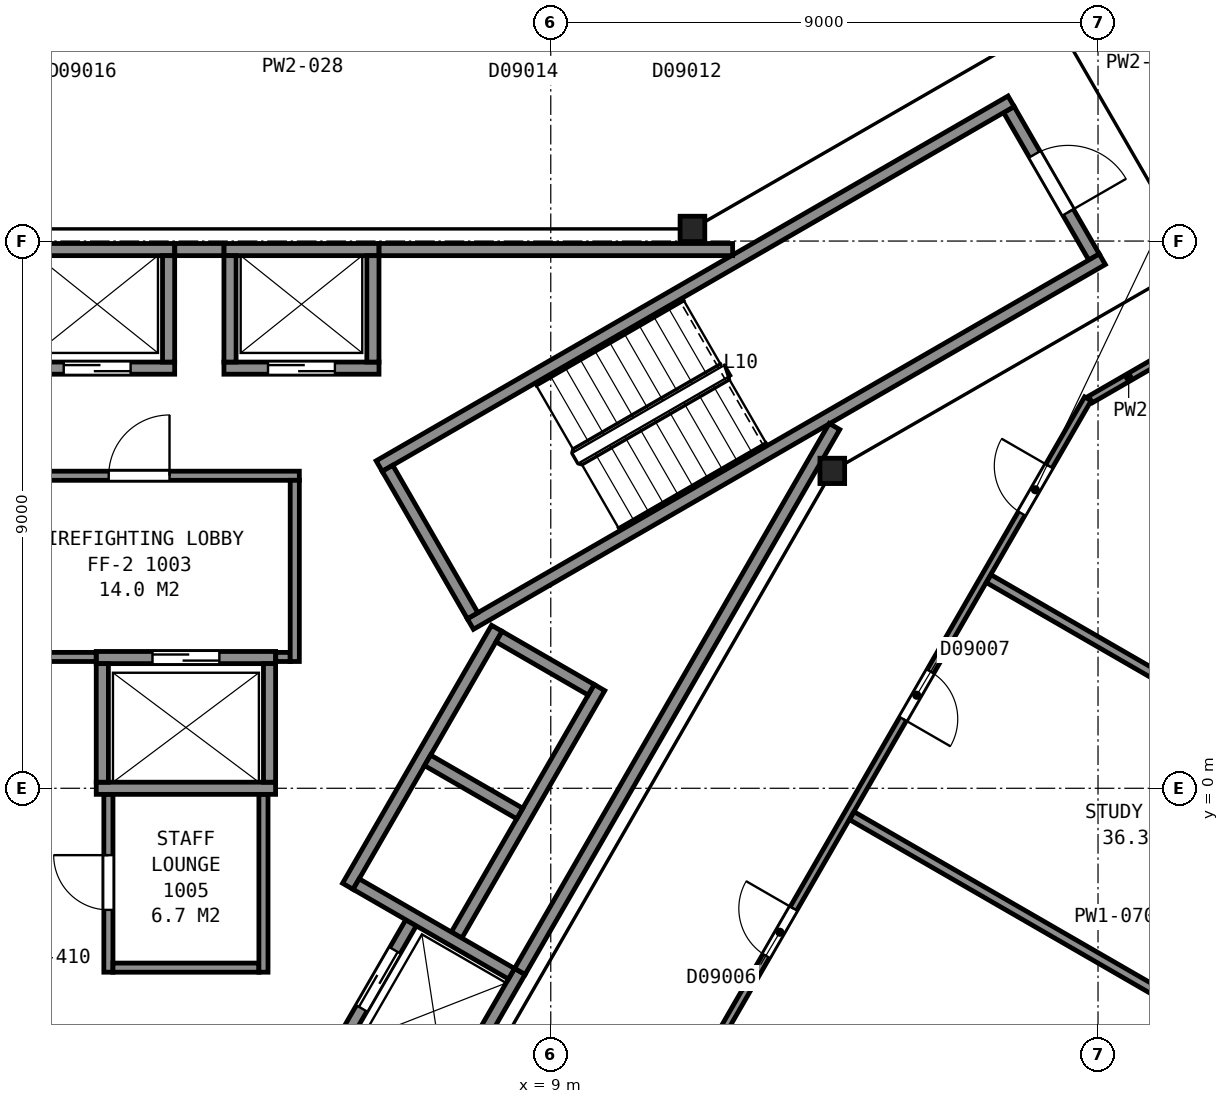
"""IFC4 building model, lengths in metres.
Left out: names, types, materials, properties, quantities, classifications, styles, units other than length and angle.
Written with IfcOpenShell. Run it as: python <this file> out.ifc"""

import sys

from ifc_helpers import new_model, si_unit, direction, frame, frame_2d, origin, origin_2d, place, context, subcontext, project, spatial, rectangle, i_section, extrude, element, fill, save


model = new_model("IFC4")
c1 = context("Model", 3, precision=1e-05, world=origin(), true_north=direction((0.0, 1.0)))
c2 = subcontext(c1, "Body", "Model", "MODEL_VIEW")
j1 = project(units=[si_unit("LENGTHUNIT", "METRE"), si_unit("PLANEANGLEUNIT", "RADIAN")], contexts=[c1])
p1 = place(None, origin())
s1 = spatial("IfcSite", under=j1, at=p1, CompositionType="ELEMENT")
p2 = place(p1, origin())
s2 = spatial("IfcBuilding", under=s1, at=p2, CompositionType="ELEMENT")
p3 = place(p2, frame((0.0, 0.0, 51.2)))
s3 = spatial("IfcBuildingStorey", under=s2, at=p3, CompositionType="ELEMENT", Elevation=51.2)
for number, where, z_axis, x_axis in (
    (1, (13.63, 5.22, 0.0), (0.0, 0.0, 1.0), (1.0, 0.0, 0.0)),
    (2, (11.33, 9.2, 0.0), (0.0, 0.0, 1.0), (1.0, 0.0, 0.0)),
):
    element("IfcColumn", number, at=place(p3, frame(where, z_axis=z_axis, x_axis=x_axis)), inside=s3, PredefinedType="COLUMN", context=c2, shape_type="SweptSolid", body=[
        extrude(i_section(OverallWidth=0.406, OverallDepth=0.417, WebThickness=0.03, FlangeThickness=0.048, FilletRadius=0.015, at=origin_2d()), origin(), (0.0, 0.0, 1.0), 3.6),
    ])
p4 = place(p3, frame((17.934, 8.738, 0.0), z_axis=(0.0, 0.0, 1.0), x_axis=(-0.49998411664, 0.866034573852, 0.0)))
e3 = element("IfcWall", 3, at=p4, inside=s3, PredefinedType="PARTITIONING", context=c2, shape_type="SweptSolid", body=[
    extrude(rectangle(XDim=2.8, YDim=0.2, at=frame_2d((1.4, 0.0))), origin(), (0.0, 0.0, 1.0), 3.35),
])
p5 = place(p4, frame((0.85, 0.0, 0.0)))
e4 = element("IfcOpeningElement", 4, at=p5, cuts=e3, PredefinedType="OPENING", context=c2, shape_type="SweptSolid", body=[
    extrude(rectangle(XDim=1.1, YDim=2.1, at=frame_2d((0.55, 1.05))), frame((0.0, 0.11, 0.0), z_axis=(0.0, -1.0, 0.0), x_axis=(1.0, 0.0, 0.0)), (0.0, 0.0, 1.0), 0.22),
])
for number, where, z_axis, x_axis in (
    (5, (6.178, 5.299, 0.0), (0.0, 0.0, 1.0), (0.866, 0.5, 0.0)),
    (6, (7.678, 2.701, 0.0), (0.0, 0.0, 1.0), (0.866, 0.5, 0.0)),
):
    element("IfcWall", number, at=place(p3, frame(where, z_axis=z_axis, x_axis=x_axis)), inside=s3, PredefinedType="PARTITIONING", context=c2, shape_type="SweptSolid", body=[
        extrude(rectangle(XDim=12.0, YDim=0.2, at=frame_2d((6.0, 0.0))), origin(), (0.0, 0.0, 1.0), 3.35),
    ])
p6 = place(p3, frame((7.715, 2.838, 0.0), z_axis=(0.0, 0.0, 1.0), x_axis=(-0.500049511043, 0.865996816683, 0.0)))
e7 = element("IfcWall", 7, at=p6, inside=s3, PredefinedType="PARTITIONING", context=c2, shape_type="SweptSolid", body=[
    extrude(rectangle(XDim=2.8, YDim=0.2, at=frame_2d((1.4, 0.0))), origin(), (0.0, 0.0, 1.0), 3.35),
])
p7 = place(p3, frame((1.525, 0.0, 0.0), z_axis=(0.0, 0.0, 1.0), x_axis=(1.0, 0.0, 0.0)))
e8 = element("IfcWall", 8, at=p7, inside=s3, PredefinedType="PARTITIONING", context=c2, shape_type="SweptSolid", body=[
    extrude(rectangle(XDim=2.95, YDim=0.2, at=frame_2d((1.475, 0.0))), origin(), (0.0, 0.0, 1.0), 3.6),
])
p8 = place(p3, frame((1.525, 2.15, 0.0), z_axis=(0.0, 0.0, 1.0), x_axis=(1.0, 0.0, 0.0)))
e9 = element("IfcWall", 9, at=p8, inside=s3, PredefinedType="PARTITIONING", context=c2, shape_type="SweptSolid", body=[
    extrude(rectangle(XDim=2.95, YDim=0.2, at=frame_2d((1.475, 0.0))), origin(), (0.0, 0.0, 1.0), 3.6),
])
p9 = place(p8, frame((0.925, 0.0, 0.0)))
e10 = element("IfcOpeningElement", 10, at=p9, cuts=e9, PredefinedType="OPENING", context=c2, shape_type="SweptSolid", body=[
    extrude(rectangle(XDim=1.1, YDim=2.1, at=frame_2d((0.55, 1.05))), frame((0.0, 0.11, 0.0), z_axis=(0.0, -1.0, 0.0), x_axis=(1.0, 0.0, 0.0)), (0.0, 0.0, 1.0), 0.22),
])
p10 = place(p3, frame((0.265, 6.91, 0.0), z_axis=(0.0, 0.0, 1.0), x_axis=(1.0, 0.0, 0.0)))
e11 = element("IfcWall", 11, at=p10, inside=s3, PredefinedType="PARTITIONING", context=c2, shape_type="SweptSolid", body=[
    extrude(rectangle(XDim=2.55, YDim=0.2, at=frame_2d((1.275, 0.0))), origin(), (0.0, 0.0, 1.0), 3.6),
])
p11 = place(p10, frame((0.725, 0.0, 0.0)))
e12 = element("IfcOpeningElement", 12, at=p11, cuts=e11, PredefinedType="OPENING", context=c2, shape_type="SweptSolid", body=[
    extrude(rectangle(XDim=1.1, YDim=2.1, at=frame_2d((0.55, 1.05))), frame((0.0, 0.11, 0.0), z_axis=(0.0, -1.0, 0.0), x_axis=(1.0, 0.0, 0.0)), (0.0, 0.0, 1.0), 0.22),
])
p12 = place(p3, frame((3.625, 6.91, 0.0), z_axis=(0.0, 0.0, 1.0), x_axis=(1.0, 0.0, 0.0)))
e13 = element("IfcWall", 13, at=p12, inside=s3, PredefinedType="PARTITIONING", context=c2, shape_type="SweptSolid", body=[
    extrude(rectangle(XDim=2.55, YDim=0.2, at=frame_2d((1.275, 0.0))), origin(), (0.0, 0.0, 1.0), 3.6),
])
p13 = place(p12, frame((0.725, 0.0, 0.0)))
e14 = element("IfcOpeningElement", 14, at=p13, cuts=e13, PredefinedType="OPENING", context=c2, shape_type="SweptSolid", body=[
    extrude(rectangle(XDim=1.1, YDim=2.1, at=frame_2d((0.55, 1.05))), frame((0.0, 0.11, 0.0), z_axis=(0.0, -1.0, 0.0), x_axis=(1.0, 0.0, 0.0)), (0.0, 0.0, 1.0), 0.22),
])
for number, where, z_axis, x_axis in (
    (15, (0.265, 8.86, 0.0), (0.0, 0.0, 1.0), (1.0, 0.0, 0.0)),
    (16, (3.625, 8.86, 0.0), (0.0, 0.0, 1.0), (1.0, 0.0, 0.0)),
):
    element("IfcWall", number, at=place(p3, frame(where, z_axis=z_axis, x_axis=x_axis)), inside=s3, PredefinedType="PARTITIONING", context=c2, shape_type="SweptSolid", body=[
        extrude(rectangle(XDim=2.55, YDim=0.2, at=frame_2d((1.275, 0.0))), origin(), (0.0, 0.0, 1.0), 3.6),
    ])
p14 = place(p3, frame((7.216, -5.222, 0.0), z_axis=(0.0, 0.0, 1.0), x_axis=(0.499990435942, 0.866030925526, 0.0)))
e17 = element("IfcWall", 17, at=p14, inside=s3, PredefinedType="PARTITIONING", context=c2, shape_type="SweptSolid", body=[
    extrude(rectangle(XDim=2.55, YDim=0.2, at=frame_2d((1.275, 0.0))), origin(), (0.0, 0.0, 1.0), 3.6),
])
p15 = place(p3, frame((7.451, -2.414, 0.0), z_axis=(0.0, 0.0, 1.0), x_axis=(0.500016218704, 0.866016039709, 0.0)))
e18 = element("IfcWall", 18, at=p15, inside=s3, PredefinedType="PARTITIONING", context=c2, shape_type="SweptSolid", body=[
    extrude(rectangle(XDim=4.7, YDim=0.2, at=frame_2d((2.35, 0.0))), origin(), (0.0, 0.0, 1.0), 3.6),
])
p16 = place(p3, frame((5.527, -4.247, 0.0), z_axis=(0.0, 0.0, 1.0), x_axis=(0.499938297808, 0.866061024631, 0.0)))
e19 = element("IfcWall", 19, at=p16, inside=s3, PredefinedType="PARTITIONING", context=c2, shape_type="SweptSolid", body=[
    extrude(rectangle(XDim=2.35, YDim=0.2, at=frame_2d((1.175, 0.0))), origin(), (0.0, 0.0, 1.0), 3.6),
])
p17 = place(p16, frame((0.725, 0.0, 0.0)))
e20 = element("IfcOpeningElement", 20, at=p17, cuts=e19, PredefinedType="OPENING", context=c2, shape_type="SweptSolid", body=[
    extrude(rectangle(XDim=1.1, YDim=2.1, at=frame_2d((0.55, 1.05))), frame((0.0, 0.11, 0.0), z_axis=(0.0, -1.0, 0.0), x_axis=(1.0, 0.0, 0.0)), (0.0, 0.0, 1.0), 0.22),
])
p18 = place(p3, frame((5.663, -1.612, 0.0), z_axis=(0.0, 0.0, 1.0), x_axis=(0.49998122708, 0.866036242063, 0.0)))
e21 = element("IfcWall", 21, at=p18, inside=s3, PredefinedType="PARTITIONING", context=c2, shape_type="SweptSolid", body=[
    extrude(rectangle(XDim=4.9, YDim=0.2, at=frame_2d((2.45, 0.0))), origin(), (0.0, 0.0, 1.0), 3.6),
])
p19 = place(p3, frame((6.075, 7.01, 0.0), z_axis=(0.0, 0.0, 1.0), x_axis=(0.0, 1.0, 0.0)))
e22 = element("IfcWall", 22, at=p19, inside=s3, PredefinedType="PARTITIONING", context=c2, shape_type="SweptSolid", body=[
    extrude(rectangle(XDim=1.75, YDim=0.2, at=frame_2d((0.875, 0.0))), origin(), (0.0, 0.0, 1.0), 3.6),
])
p20 = place(p3, frame((4.375, 0.1, 0.0), z_axis=(0.0, 0.0, 1.0), x_axis=(0.0, 1.0, 0.0)))
e23 = element("IfcWall", 23, at=p20, inside=s3, PredefinedType="PARTITIONING", context=c2, shape_type="SweptSolid", body=[
    extrude(rectangle(XDim=1.95, YDim=0.2, at=frame_2d((0.975, 0.0))), origin(), (0.0, 0.0, 1.0), 3.6),
])
for number, where, z_axis, x_axis in (
    (24, (3.725, 7.01, 0.0), (0.0, 0.0, 1.0), (0.0, 1.0, 0.0)),
    (25, (2.715, 7.01, 0.0), (0.0, 0.0, 1.0), (0.0, 1.0, 0.0)),
):
    element("IfcWall", number, at=place(p3, frame(where, z_axis=z_axis, x_axis=x_axis)), inside=s3, PredefinedType="PARTITIONING", context=c2, shape_type="SweptSolid", body=[
        extrude(rectangle(XDim=1.75, YDim=0.2, at=frame_2d((0.875, 0.0))), origin(), (0.0, 0.0, 1.0), 3.6),
    ])
p21 = place(p3, frame((1.625, 0.1, 0.0), z_axis=(0.0, 0.0, 1.0), x_axis=(0.0, 1.0, 0.0)))
e26 = element("IfcWall", 26, at=p21, inside=s3, PredefinedType="PARTITIONING", context=c2, shape_type="SweptSolid", body=[
    extrude(rectangle(XDim=1.95, YDim=0.2, at=frame_2d((0.975, 0.0))), origin(), (0.0, 0.0, 1.0), 3.6),
])
p22 = place(p3, frame((9.665, 1.62, 0.0), z_axis=(0.0, 0.0, 1.0), x_axis=(-0.866002029911, 0.500040482552, 0.0)))
e27 = element("IfcWall", 27, at=p22, inside=s3, PredefinedType="PARTITIONING", context=c2, shape_type="SweptSolid", body=[
    extrude(rectangle(XDim=1.75, YDim=0.2, at=frame_2d((0.875, 0.0))), origin(), (0.0, 0.0, 1.0), 3.6),
])
p23 = place(p3, frame((8.49, -0.416, 0.0), z_axis=(0.0, 0.0, 1.0), x_axis=(-0.866036909293, 0.499980071345, 0.0)))
e28 = element("IfcWall", 28, at=p23, inside=s3, PredefinedType="PARTITIONING", context=c2, shape_type="SweptSolid", body=[
    extrude(rectangle(XDim=1.75, YDim=0.2, at=frame_2d((0.875, 0.0))), origin(), (0.0, 0.0, 1.0), 3.6),
])
p24 = place(p3, frame((8.354, -3.051, 0.0), z_axis=(0.0, 0.0, 1.0), x_axis=(-0.866060182126, 0.499939757307, 0.0)))
e29 = element("IfcWall", 29, at=p24, inside=s3, PredefinedType="PARTITIONING", context=c2, shape_type="SweptSolid", body=[
    extrude(rectangle(XDim=2.95, YDim=0.2, at=frame_2d((1.475, 0.0))), origin(), (0.0, 0.0, 1.0), 3.6),
])
p25 = place(p3, frame((-0.245, 5.14, 0.0), z_axis=(0.0, 0.0, 1.0), x_axis=(1.0, 0.0, 0.0)))
e30 = element("IfcWall", 30, at=p25, inside=s3, PredefinedType="PARTITIONING", context=c2, shape_type="SweptSolid", body=[
    extrude(rectangle(XDim=5.11, YDim=0.15, at=frame_2d((2.555, 0.0))), origin(), (0.0, 0.0, 1.0), 3.35),
])
p26 = place(p25, frame((1.975, 0.0, 0.0)))
e31 = element("IfcOpeningElement", 31, at=p26, cuts=e30, PredefinedType="OPENING", context=c2, shape_type="SweptSolid", body=[
    extrude(rectangle(XDim=1.0, YDim=2.1, at=frame_2d((0.5, 1.05))), frame((0.0, 0.085, 0.0), z_axis=(0.0, -1.0, 0.0), x_axis=(1.0, 0.0, 0.0)), (0.0, 0.0, 1.0), 0.17),
])
p27 = place(p3, frame((0.167, 2.16, 0.0), z_axis=(0.0, 0.0, 1.0), x_axis=(1.0, 0.0, 0.0)))
e32 = element("IfcWall", 32, at=p27, inside=s3, PredefinedType="PARTITIONING", context=c2, shape_type="SweptSolid", body=[
    extrude(rectangle(XDim=1.356, YDim=0.15, at=frame_2d((0.678, 0.0))), origin(), (0.0, 0.0, 1.0), 3.35),
])
p28 = place(p3, frame((1.725, -0.102, 0.0), z_axis=(0.0, 0.0, 1.0), x_axis=(0.0, -1.0, 0.0)))
e33 = element("IfcWall", 33, at=p28, inside=s3, PredefinedType="PARTITIONING", context=c2, shape_type="SweptSolid", body=[
    extrude(rectangle(XDim=2.923, YDim=0.15, at=frame_2d((1.461, 0.0))), origin(), (0.0, 0.0, 1.0), 3.35),
])
p29 = place(p28, frame((0.998, 0.0, 0.0)))
e34 = element("IfcOpeningElement", 34, at=p29, cuts=e33, PredefinedType="OPENING", context=c2, shape_type="SweptSolid", body=[
    extrude(rectangle(XDim=0.9, YDim=2.1, at=frame_2d((0.45, 1.05))), frame((0.0, 0.085, 0.0), z_axis=(0.0, -1.0, 0.0), x_axis=(1.0, 0.0, 0.0)), (0.0, 0.0, 1.0), 0.17),
])
p30 = place(p3, frame((1.8, -2.95, 0.0), z_axis=(0.0, 0.0, 1.0), x_axis=(1.0, 0.0, 0.0)))
e35 = element("IfcWall", 35, at=p30, inside=s3, PredefinedType="PARTITIONING", context=c2, shape_type="SweptSolid", body=[
    extrude(rectangle(XDim=2.4, YDim=0.15, at=frame_2d((1.2, 0.0))), origin(), (0.0, 0.0, 1.0), 3.35),
])
p31 = place(p3, frame((2.817, 8.86, 0.0), z_axis=(0.0, 0.0, 1.0), x_axis=(1.0, 0.0, 0.0)))
e36 = element("IfcWall", 36, at=p31, inside=s3, PredefinedType="PARTITIONING", context=c2, shape_type="SweptSolid", body=[
    extrude(rectangle(XDim=0.806, YDim=0.2, at=frame_2d((0.403, 0.0))), origin(), (0.0, 0.0, 1.0), 3.35),
])
p32 = place(p3, frame((4.275, -3.025, 0.0), z_axis=(0.0, 0.0, 1.0), x_axis=(0.0, 1.0, 0.0)))
e37 = element("IfcWall", 37, at=p32, inside=s3, PredefinedType="PARTITIONING", context=c2, shape_type="SweptSolid", body=[
    extrude(rectangle(XDim=2.923, YDim=0.15, at=frame_2d((1.461, 0.0))), origin(), (0.0, 0.0, 1.0), 3.35),
])
p33 = place(p3, frame((4.477, 2.16, 0.0), z_axis=(0.0, 0.0, 1.0), x_axis=(1.0, 0.0, 0.0)))
e38 = element("IfcWall", 38, at=p33, inside=s3, PredefinedType="PARTITIONING", context=c2, shape_type="SweptSolid", body=[
    extrude(rectangle(XDim=0.238, YDim=0.15, at=frame_2d((0.119, 0.0))), origin(), (0.0, 0.0, 1.0), 3.35),
])
p34 = place(p3, frame((4.79, 2.085, 0.0), z_axis=(0.0, 0.0, 1.0), x_axis=(0.0, 1.0, 0.0)))
e39 = element("IfcWall", 39, at=p34, inside=s3, PredefinedType="PARTITIONING", context=c2, shape_type="SweptSolid", body=[
    extrude(rectangle(XDim=2.98, YDim=0.15, at=frame_2d((1.49, 0.0))), origin(), (0.0, 0.0, 1.0), 3.35),
])
p35 = place(p3, frame((6.177, 8.86, 0.0), z_axis=(0.0, 0.0, 1.0), x_axis=(1.0, 0.0, 0.0)))
e40 = element("IfcWall", 40, at=p35, inside=s3, PredefinedType="PARTITIONING", context=c2, shape_type="SweptSolid", body=[
    extrude(rectangle(XDim=5.814, YDim=0.2, at=frame_2d((2.907, 0.0))), origin(), (0.0, 0.0, 1.0), 3.35),
])
p36 = place(p3, frame((8.492, -3.012, 0.0), z_axis=(0.0, 0.0, 1.0), x_axis=(0.499972957231, 0.866041016371, 0.0)))
e41 = element("IfcWall", 41, at=p36, inside=s3, PredefinedType="PARTITIONING", context=c2, shape_type="SweptSolid", body=[
    extrude(rectangle(XDim=10.349, YDim=0.2, at=frame_2d((5.174, 0.0))), origin(), (0.0, 0.0, 1.0), 3.35),
])
p37 = place(p3, frame((17.833, 6.406, 0.0), z_axis=(0.0, 0.0, 1.0), x_axis=(-0.500002884005, -0.866023738697, 0.0)))
e42 = element("IfcWall", 42, at=p37, inside=s3, PredefinedType="PARTITIONING", context=c2, shape_type="SweptSolid", body=[
    extrude(rectangle(XDim=28.135, YDim=0.125, at=frame_2d((14.067, 0.0))), origin(), (0.0, 0.0, 1.0), 2.613),
])
p38 = place(p37, frame((26.522, 0.0, 0.0)))
e43 = element("IfcOpeningElement", 43, at=p38, cuts=e42, PredefinedType="OPENING", context=c2, shape_type="SweptSolid", body=[
    extrude(rectangle(XDim=0.9, YDim=2.1, at=frame_2d((0.45, 1.05))), frame((0.0, 0.073, 0.0), z_axis=(0.0, -1.0, 0.0), x_axis=(1.0, 0.0, 0.0)), (0.0, 0.0, 1.0), 0.145),
])
p39 = place(p37, frame((23.184, 0.0, 0.0)))
e44 = element("IfcOpeningElement", 44, at=p39, cuts=e42, PredefinedType="OPENING", context=c2, shape_type="SweptSolid", body=[
    extrude(rectangle(XDim=0.9, YDim=2.1, at=frame_2d((0.45, 1.05))), frame((0.0, 0.073, 0.0), z_axis=(0.0, -1.0, 0.0), x_axis=(1.0, 0.0, 0.0)), (0.0, 0.0, 1.0), 0.145),
])
p40 = place(p37, frame((18.683, 0.0, 0.0)))
e45 = element("IfcOpeningElement", 45, at=p40, cuts=e42, PredefinedType="OPENING", context=c2, shape_type="SweptSolid", body=[
    extrude(rectangle(XDim=0.9, YDim=2.1, at=frame_2d((0.45, 1.05))), frame((0.0, 0.073, 0.0), z_axis=(0.0, -1.0, 0.0), x_axis=(1.0, 0.0, 0.0)), (0.0, 0.0, 1.0), 0.145),
])
p41 = place(p37, frame((14.182, 0.0, 0.0)))
e46 = element("IfcOpeningElement", 46, at=p41, cuts=e42, PredefinedType="OPENING", context=c2, shape_type="SweptSolid", body=[
    extrude(rectangle(XDim=0.9, YDim=2.1, at=frame_2d((0.45, 1.05))), frame((0.0, 0.073, 0.0), z_axis=(0.0, -1.0, 0.0), x_axis=(1.0, 0.0, 0.0)), (0.0, 0.0, 1.0), 0.145),
])
p42 = place(p37, frame((9.681, 0.0, 0.0)))
e47 = element("IfcOpeningElement", 47, at=p42, cuts=e42, PredefinedType="OPENING", context=c2, shape_type="SweptSolid", body=[
    extrude(rectangle(XDim=0.9, YDim=2.1, at=frame_2d((0.45, 1.05))), frame((0.0, 0.073, 0.0), z_axis=(0.0, -1.0, 0.0), x_axis=(1.0, 0.0, 0.0)), (0.0, 0.0, 1.0), 0.145),
])
p43 = place(p37, frame((5.18, 0.0, 0.0)))
e48 = element("IfcOpeningElement", 48, at=p43, cuts=e42, PredefinedType="OPENING", context=c2, shape_type="SweptSolid", body=[
    extrude(rectangle(XDim=0.9, YDim=2.1, at=frame_2d((0.45, 1.05))), frame((0.0, 0.073, 0.0), z_axis=(0.0, -1.0, 0.0), x_axis=(1.0, 0.0, 0.0)), (0.0, 0.0, 1.0), 0.145),
])
p44 = place(p37, frame((1.278, 0.0, 0.0)))
e49 = element("IfcOpeningElement", 49, at=p44, cuts=e42, PredefinedType="OPENING", context=c2, shape_type="SweptSolid", body=[
    extrude(rectangle(XDim=0.9, YDim=2.1, at=frame_2d((0.45, 1.05))), frame((0.0, 0.073, 0.0), z_axis=(0.0, -1.0, 0.0), x_axis=(1.0, 0.0, 0.0)), (0.0, 0.0, 1.0), 0.145),
])
p45 = place(p3, frame((13.951, -0.452, 0.0), z_axis=(0.0, 0.0, 1.0), x_axis=(0.866027553047, -0.499996277349, 0.0)))
e50 = element("IfcWall", 50, at=p45, inside=s3, PredefinedType="PARTITIONING", context=c2, shape_type="SweptSolid", body=[
    extrude(rectangle(XDim=8.387, YDim=0.15, at=frame_2d((4.193, 0.0))), origin(), (0.0, 0.0, 1.0), 2.613),
])
p46 = place(p3, frame((16.202, 3.447, 0.0), z_axis=(0.0, 0.0, 1.0), x_axis=(0.866047434595, -0.499961839574, 0.0)))
e51 = element("IfcWall", 51, at=p46, inside=s3, PredefinedType="PARTITIONING", context=c2, shape_type="SweptSolid", body=[
    extrude(rectangle(XDim=8.387, YDim=0.15, at=frame_2d((4.193, 0.0))), origin(), (0.0, 0.0, 1.0), 2.613),
])
p47 = place(p3, frame((17.875, 6.395, 0.0), z_axis=(0.0, 0.0, 1.0), x_axis=(0.865894215669, 0.500227155672, 0.0)))
e52 = element("IfcWall", 52, at=p47, inside=s3, PredefinedType="PARTITIONING", context=c2, shape_type="SweptSolid", body=[
    extrude(rectangle(XDim=1.451, YDim=0.125, at=frame_2d((0.726, 0.0))), origin(), (0.0, 0.0, 1.0), 2.613),
])
p48 = place(p5, origin())
e53 = element("IfcDoor", 53, at=p48, inside=s3, OperationType="SINGLE_SWING_LEFT", PredefinedType="DOOR", context=c2, shape_type="SweptSolid", body=[
    extrude(rectangle(XDim=1.1, YDim=2.1, at=frame_2d((0.55, 1.05))), frame((0.0, 0.025, 0.0), z_axis=(0.0, -1.0, 0.0), x_axis=(1.0, 0.0, 0.0)), (0.0, 0.0, 1.0), 0.05),
])
fill(e4, e53)
p49 = place(p11, origin())
e54 = element("IfcDoor", 54, at=p49, inside=s3, OperationType="SLIDING_TO_LEFT", PredefinedType="DOOR", context=c2, shape_type="SweptSolid", body=[
    extrude(rectangle(XDim=1.1, YDim=2.1, at=frame_2d((0.55, 1.05))), frame((0.0, 0.025, 0.0), z_axis=(0.0, -1.0, 0.0), x_axis=(1.0, 0.0, 0.0)), (0.0, 0.0, 1.0), 0.05),
])
fill(e12, e54)
p50 = place(p13, origin())
e55 = element("IfcDoor", 55, at=p50, inside=s3, OperationType="SLIDING_TO_LEFT", PredefinedType="DOOR", context=c2, shape_type="SweptSolid", body=[
    extrude(rectangle(XDim=1.1, YDim=2.1, at=frame_2d((0.55, 1.05))), frame((0.0, 0.025, 0.0), z_axis=(0.0, -1.0, 0.0), x_axis=(1.0, 0.0, 0.0)), (0.0, 0.0, 1.0), 0.05),
])
fill(e14, e55)
p51 = place(p17, origin())
e56 = element("IfcDoor", 56, at=p51, inside=s3, OperationType="SLIDING_TO_LEFT", PredefinedType="DOOR", context=c2, shape_type="SweptSolid", body=[
    extrude(rectangle(XDim=1.1, YDim=2.1, at=frame_2d((0.55, 1.05))), frame((0.0, 0.025, 0.0), z_axis=(0.0, -1.0, 0.0), x_axis=(1.0, 0.0, 0.0)), (0.0, 0.0, 1.0), 0.05),
])
fill(e20, e56)
p52 = place(p9, origin())
e57 = element("IfcDoor", 57, at=p52, inside=s3, OperationType="SLIDING_TO_RIGHT", PredefinedType="DOOR", context=c2, shape_type="SweptSolid", body=[
    extrude(rectangle(XDim=1.1, YDim=2.1, at=frame_2d((0.55, 1.05))), frame((0.0, 0.025, 0.0), z_axis=(0.0, -1.0, 0.0), x_axis=(1.0, 0.0, 0.0)), (0.0, 0.0, 1.0), 0.05),
])
fill(e10, e57)
p53 = place(p26, origin())
e58 = element("IfcDoor", 58, at=p53, inside=s3, OperationType="SINGLE_SWING_RIGHT", PredefinedType="DOOR", context=c2, shape_type="SweptSolid", body=[
    extrude(rectangle(XDim=1.0, YDim=2.1, at=frame_2d((0.5, 1.05))), frame((0.0, 0.025, 0.0), z_axis=(0.0, -1.0, 0.0), x_axis=(1.0, 0.0, 0.0)), (0.0, 0.0, 1.0), 0.05),
])
fill(e31, e58)
p54 = place(p29, origin())
e59 = element("IfcDoor", 59, at=p54, inside=s3, OperationType="SINGLE_SWING_LEFT", PredefinedType="DOOR", context=c2, shape_type="SweptSolid", body=[
    extrude(rectangle(XDim=0.9, YDim=2.1, at=frame_2d((0.45, 1.05))), frame((0.0, 0.025, 0.0), z_axis=(0.0, -1.0, 0.0), x_axis=(1.0, 0.0, 0.0)), (0.0, 0.0, 1.0), 0.05),
])
fill(e34, e59)
p55 = place(p42, origin())
e60 = element("IfcDoor", 60, at=p55, inside=s3, OperationType="SINGLE_SWING_LEFT", PredefinedType="DOOR", context=c2, shape_type="SweptSolid", body=[
    extrude(rectangle(XDim=0.9, YDim=2.1, at=frame_2d((0.45, 1.05))), frame((0.0, 0.025, 0.0), z_axis=(0.0, -1.0, 0.0), x_axis=(1.0, 0.0, 0.0)), (0.0, 0.0, 1.0), 0.05),
])
fill(e47, e60)
p56 = place(p43, origin())
e61 = element("IfcDoor", 61, at=p56, inside=s3, OperationType="SINGLE_SWING_RIGHT", PredefinedType="DOOR", context=c2, shape_type="SweptSolid", body=[
    extrude(rectangle(XDim=0.9, YDim=2.1, at=frame_2d((0.45, 1.05))), frame((0.0, 0.025, 0.0), z_axis=(0.0, -1.0, 0.0), x_axis=(1.0, 0.0, 0.0)), (0.0, 0.0, 1.0), 0.05),
])
fill(e48, e61)
p57 = place(p44, origin())
e62 = element("IfcDoor", 62, at=p57, inside=s3, OperationType="SINGLE_SWING_LEFT", PredefinedType="DOOR", context=c2, shape_type="SweptSolid", body=[
    extrude(rectangle(XDim=0.9, YDim=2.1, at=frame_2d((0.45, 1.05))), frame((0.0, 0.025, 0.0), z_axis=(0.0, -1.0, 0.0), x_axis=(1.0, 0.0, 0.0)), (0.0, 0.0, 1.0), 0.05),
])
fill(e49, e62)
save(model, sys.argv[1])
